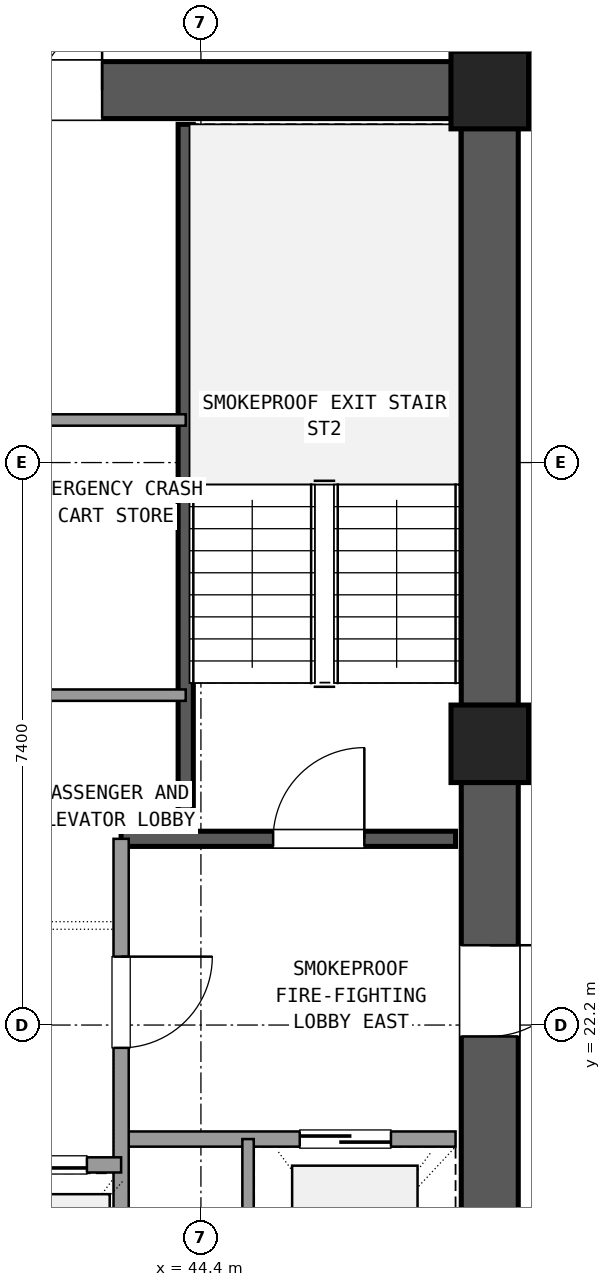
"""IFC4 building model, lengths in metres.
Left out: names, types, materials, properties, quantities, classifications, styles, units other than length and angle.
Written with IfcOpenShell. Run it as: python <this file> out.ifc"""

import sys

from ifc_helpers import new_model, si_unit, direction, frame, frame_2d, origin, origin_2d, place, context, subcontext, project, spatial, rectangle, extrude, element, fill, save


model = new_model("IFC4")
c1 = context("Model", 3, precision=1e-05, world=origin(), true_north=direction((0.0, 1.0)))
c2 = subcontext(c1, "Body", "Model", "MODEL_VIEW")
j1 = project(units=[si_unit("LENGTHUNIT", "METRE"), si_unit("PLANEANGLEUNIT", "RADIAN")], contexts=[c1])
p1 = place(None, origin())
s1 = spatial("IfcSite", under=j1, at=p1, CompositionType="ELEMENT")
p2 = place(p1, origin())
s2 = spatial("IfcBuilding", under=s1, at=p2, CompositionType="ELEMENT")
p3 = place(p2, frame((0.0, 0.0, 120.78)))
s3 = spatial("IfcBuildingStorey", under=s2, at=p3, CompositionType="ELEMENT", Elevation=120.78)
for number, where, z_axis, x_axis in (
    (1, (48.2, 25.9, 0.0), (0.0, 0.0, 1.0), (1.0, 0.0, 0.0)),
    (2, (48.2, 34.5, 0.0), (0.0, 0.0, 1.0), (1.0, 0.0, 0.0)),
):
    element("IfcColumn", number, at=place(p3, frame(where, z_axis=z_axis, x_axis=x_axis)), inside=s3, PredefinedType="COLUMN", context=c2, shape_type="SweptSolid", body=[
        extrude(rectangle(XDim=1.02, YDim=1.02, at=origin_2d()), origin(), (0.0, 0.0, 1.0), 3.6),
    ])
p4 = place(p3, frame((48.2, 17.805, 0.0), z_axis=(0.0, 0.0, 1.0), x_axis=(0.0, 1.0, 0.0)))
e3 = element("IfcWall", 3, at=p4, inside=s3, PredefinedType="SHEAR", context=c2, shape_type="SweptSolid", body=[
    extrude(rectangle(XDim=7.59, YDim=0.75, at=frame_2d((3.795, 0.0))), origin(), (0.0, 0.0, 1.0), 3.3),
])
p5 = place(p4, frame((4.245, 0.0, 0.0)))
e4 = element("IfcOpeningElement", 4, at=p5, cuts=e3, PredefinedType="OPENING", context=c2, shape_type="SweptSolid", body=[
    extrude(rectangle(XDim=1.2, YDim=2.15, at=frame_2d((0.6, 1.075))), frame((0.0, 0.385, 0.0), z_axis=(0.0, -1.0, 0.0), x_axis=(1.0, 0.0, 0.0)), (0.0, 0.0, 1.0), 0.77),
])
p6 = place(p3, frame((48.2, 26.405, 0.0), z_axis=(0.0, 0.0, 1.0), x_axis=(0.0, 1.0, 0.0)))
e5 = element("IfcWall", 5, at=p6, inside=s3, PredefinedType="SHEAR", context=c2, shape_type="SweptSolid", body=[
    extrude(rectangle(XDim=7.59, YDim=0.75, at=frame_2d((3.795, 0.0))), origin(), (0.0, 0.0, 1.0), 3.3),
])
p7 = place(p3, frame((47.695, 34.5, 0.0), z_axis=(0.0, 0.0, 1.0), x_axis=(-1.0, 0.0, 0.0)))
e6 = element("IfcWall", 6, at=p7, inside=s3, PredefinedType="SHEAR", context=c2, shape_type="SweptSolid", body=[
    extrude(rectangle(XDim=10.19, YDim=0.75, at=frame_2d((5.095, 0.0))), origin(), (0.0, 0.0, 1.0), 3.3),
])
p8 = place(p7, frame((4.595, 0.0, 0.0)))
e7 = element("IfcOpeningElement", 7, at=p8, cuts=e6, PredefinedType="OPENING", context=c2, shape_type="SweptSolid", body=[
    extrude(rectangle(XDim=1.6, YDim=2.2, at=frame_2d((0.8, 1.1))), frame((0.0, 0.385, 0.0), z_axis=(0.0, -1.0, 0.0), x_axis=(1.0, 0.0, 0.0)), (0.0, 0.0, 1.0), 0.77),
])
p9 = place(p3, frame((44.2, 24.65, 0.0), z_axis=(0.0, 0.0, 1.0), x_axis=(0.0, 1.0, 0.0)))
e8 = element("IfcWall", 8, at=p9, inside=s3, PredefinedType="SHEAR", context=c2, shape_type="SweptSolid", body=[
    extrude(rectangle(XDim=9.4, YDim=0.2, at=frame_2d((4.7, 0.0))), origin(), (0.0, 0.0, 1.0), 3.3),
])
p10 = place(p3, frame((43.35, 24.65, 0.0), z_axis=(0.0, 0.0, 1.0), x_axis=(1.0, 0.0, 0.0)))
e9 = element("IfcWall", 9, at=p10, inside=s3, PredefinedType="SHEAR", context=c2, shape_type="SweptSolid", body=[
    extrude(rectangle(XDim=4.4, YDim=0.2, at=frame_2d((2.2, 0.0))), origin(), (0.0, 0.0, 1.0), 3.3),
])
p11 = place(p10, frame((2.0, 0.0, 0.0)))
e10 = element("IfcOpeningElement", 10, at=p11, cuts=e9, PredefinedType="OPENING", context=c2, shape_type="SweptSolid", body=[
    extrude(rectangle(XDim=1.2, YDim=2.15, at=frame_2d((0.6, 1.075))), frame((0.0, 0.11, 0.0), z_axis=(0.0, -1.0, 0.0), x_axis=(1.0, 0.0, 0.0)), (0.0, 0.0, 1.0), 0.22),
])
p12 = place(p3, frame((43.35, 20.7, 0.0), z_axis=(0.0, 0.0, 1.0), x_axis=(1.0, 0.0, 0.0)))
e11 = element("IfcWall", 11, at=p12, inside=s3, PredefinedType="SOLIDWALL", context=c2, shape_type="SweptSolid", body=[
    extrude(rectangle(XDim=4.4, YDim=0.2, at=frame_2d((2.2, 0.0))), origin(), (0.0, 0.0, 1.0), 2.59),
])
p13 = place(p12, frame((2.35, 0.0, 0.0)))
e12 = element("IfcOpeningElement", 12, at=p13, cuts=e11, PredefinedType="OPENING", context=c2, shape_type="SweptSolid", body=[
    extrude(rectangle(XDim=1.2, YDim=2.15, at=frame_2d((0.6, 1.075))), frame((0.0, 0.11, 0.0), z_axis=(0.0, -1.0, 0.0), x_axis=(1.0, 0.0, 0.0)), (0.0, 0.0, 1.0), 0.22),
])
p14 = place(p3, frame((43.35, 17.75, 0.0), z_axis=(0.0, 0.0, 1.0), x_axis=(0.0, 1.0, 0.0)))
e13 = element("IfcWall", 13, at=p14, inside=s3, PredefinedType="SOLIDWALL", context=c2, shape_type="SweptSolid", body=[
    extrude(rectangle(XDim=6.9, YDim=0.2, at=frame_2d((3.45, 0.0))), origin(), (0.0, 0.0, 1.0), 2.59),
])
p15 = place(p14, frame((4.15, 0.0, 0.0)))
e14 = element("IfcOpeningElement", 14, at=p15, cuts=e13, PredefinedType="OPENING", context=c2, shape_type="SweptSolid", body=[
    extrude(rectangle(XDim=1.2, YDim=2.15, at=frame_2d((0.6, 1.075))), frame((0.0, 0.11, 0.0), z_axis=(0.0, -1.0, 0.0), x_axis=(1.0, 0.0, 0.0)), (0.0, 0.0, 1.0), 0.22),
])
p16 = place(p3, frame((45.02, 17.75, 0.0), z_axis=(0.0, 0.0, 1.0), x_axis=(0.0, 1.0, 0.0)))
e15 = element("IfcWall", 15, at=p16, inside=s3, PredefinedType="PARTITIONING", context=c2, shape_type="SweptSolid", body=[
    extrude(rectangle(XDim=2.95, YDim=0.15, at=frame_2d((1.475, 0.0))), origin(), (0.0, 0.0, 1.0), 2.59),
])
p17 = place(p3, frame((37.25, 20.36, 0.0), z_axis=(0.0, 0.0, 1.0), x_axis=(1.0, 0.0, 0.0)))
e16 = element("IfcWall", 16, at=p17, inside=s3, PredefinedType="SOLIDWALL", context=c2, shape_type="SweptSolid", body=[
    extrude(rectangle(XDim=6.1, YDim=0.2, at=frame_2d((3.05, 0.0))), origin(), (0.0, 0.0, 1.0), 2.59),
])
p18 = place(p17, frame((0.45, 0.0, 0.0)))
e17 = element("IfcOpeningElement", 17, at=p18, cuts=e16, PredefinedType="OPENING", context=c2, shape_type="SweptSolid", body=[
    extrude(rectangle(XDim=1.1, YDim=2.15, at=frame_2d((0.55, 1.075))), frame((0.0, 0.11, 0.0), z_axis=(0.0, -1.0, 0.0), x_axis=(1.0, 0.0, 0.0)), (0.0, 0.0, 1.0), 0.22),
])
p19 = place(p17, frame((2.5, 0.0, 0.0)))
e18 = element("IfcOpeningElement", 18, at=p19, cuts=e16, PredefinedType="OPENING", context=c2, shape_type="SweptSolid", body=[
    extrude(rectangle(XDim=1.1, YDim=2.15, at=frame_2d((0.55, 1.075))), frame((0.0, 0.11, 0.0), z_axis=(0.0, -1.0, 0.0), x_axis=(1.0, 0.0, 0.0)), (0.0, 0.0, 1.0), 0.22),
])
p20 = place(p17, frame((4.55, 0.0, 0.0)))
e19 = element("IfcOpeningElement", 19, at=p20, cuts=e16, PredefinedType="OPENING", context=c2, shape_type="SweptSolid", body=[
    extrude(rectangle(XDim=1.1, YDim=2.15, at=frame_2d((0.55, 1.075))), frame((0.0, 0.11, 0.0), z_axis=(0.0, -1.0, 0.0), x_axis=(1.0, 0.0, 0.0)), (0.0, 0.0, 1.0), 0.22),
])
for number, where, z_axis, x_axis in (
    (20, (42.27, 26.54, 0.0), (0.0, 0.0, 1.0), (1.0, 0.0, 0.0)),
    (21, (42.27, 30.16, 0.0), (0.0, 0.0, 1.0), (1.0, 0.0, 0.0)),
):
    element("IfcWall", number, at=place(p3, frame(where, z_axis=z_axis, x_axis=x_axis)), inside=s3, PredefinedType="PARTITIONING", context=c2, shape_type="SweptSolid", body=[
        extrude(rectangle(XDim=1.93, YDim=0.15, at=frame_2d((0.965, 0.0))), origin(), (0.0, 0.0, 1.0), 2.59),
    ])
p21 = place(p11, origin())
e22 = element("IfcDoor", 22, at=p21, inside=s3, OperationType="SINGLE_SWING_RIGHT", PredefinedType="DOOR", context=c2, shape_type="SweptSolid", body=[
    extrude(rectangle(XDim=1.2, YDim=2.15, at=frame_2d((0.6, 1.075))), frame((0.0, 0.025, 0.0), z_axis=(0.0, -1.0, 0.0), x_axis=(1.0, 0.0, 0.0)), (0.0, 0.0, 1.0), 0.05),
])
fill(e10, e22)
p22 = place(p13, origin())
e23 = element("IfcDoor", 23, at=p22, inside=s3, OperationType="SLIDING_TO_RIGHT", PredefinedType="DOOR", context=c2, shape_type="SweptSolid", body=[
    extrude(rectangle(XDim=1.2, YDim=2.15, at=frame_2d((0.6, 1.075))), frame((0.0, 0.025, 0.0), z_axis=(0.0, -1.0, 0.0), x_axis=(1.0, 0.0, 0.0)), (0.0, 0.0, 1.0), 0.05),
])
fill(e12, e23)
p23 = place(p15, frame((1.2, 0.0, 0.0), z_axis=(0.0, 0.0, 1.0), x_axis=(-1.0, 0.0, 0.0)))
e24 = element("IfcDoor", 24, at=p23, inside=s3, OperationType="SINGLE_SWING_RIGHT", PredefinedType="DOOR", context=c2, shape_type="SweptSolid", body=[
    extrude(rectangle(XDim=1.2, YDim=2.15, at=frame_2d((0.6, 1.075))), frame((0.0, 0.025, 0.0), z_axis=(0.0, -1.0, 0.0), x_axis=(1.0, 0.0, 0.0)), (0.0, 0.0, 1.0), 0.05),
])
fill(e14, e24)
p24 = place(p5, frame((1.2, 0.0, 0.0), z_axis=(0.0, 0.0, 1.0), x_axis=(-1.0, 0.0, 0.0)))
e25 = element("IfcDoor", 25, at=p24, inside=s3, OperationType="SINGLE_SWING_RIGHT", PredefinedType="DOOR", context=c2, shape_type="SweptSolid", body=[
    extrude(rectangle(XDim=1.2, YDim=2.15, at=frame_2d((0.6, 1.075))), frame((0.0, 0.025, 0.0), z_axis=(0.0, -1.0, 0.0), x_axis=(1.0, 0.0, 0.0)), (0.0, 0.0, 1.0), 0.05),
])
fill(e4, e25)
p25 = place(p8, frame((1.6, 0.0, 0.0), z_axis=(0.0, 0.0, 1.0), x_axis=(-1.0, 0.0, 0.0)))
e26 = element("IfcDoor", 26, at=p25, inside=s3, OperationType="DOUBLE_DOOR_SINGLE_SWING", PredefinedType="DOOR", context=c2, shape_type="SweptSolid", body=[
    extrude(rectangle(XDim=1.6, YDim=2.2, at=frame_2d((0.8, 1.1))), frame((0.0, 0.025, 0.0), z_axis=(0.0, -1.0, 0.0), x_axis=(1.0, 0.0, 0.0)), (0.0, 0.0, 1.0), 0.05),
])
fill(e7, e26)
p26 = place(p20, origin())
e27 = element("IfcDoor", 27, at=p26, inside=s3, OperationType="SLIDING_TO_LEFT", PredefinedType="DOOR", context=c2, shape_type="SweptSolid", body=[
    extrude(rectangle(XDim=1.1, YDim=2.15, at=frame_2d((0.55, 1.075))), frame((0.0, 0.025, 0.0), z_axis=(0.0, -1.0, 0.0), x_axis=(1.0, 0.0, 0.0)), (0.0, 0.0, 1.0), 0.05),
])
fill(e19, e27)
save(model, sys.argv[1])
